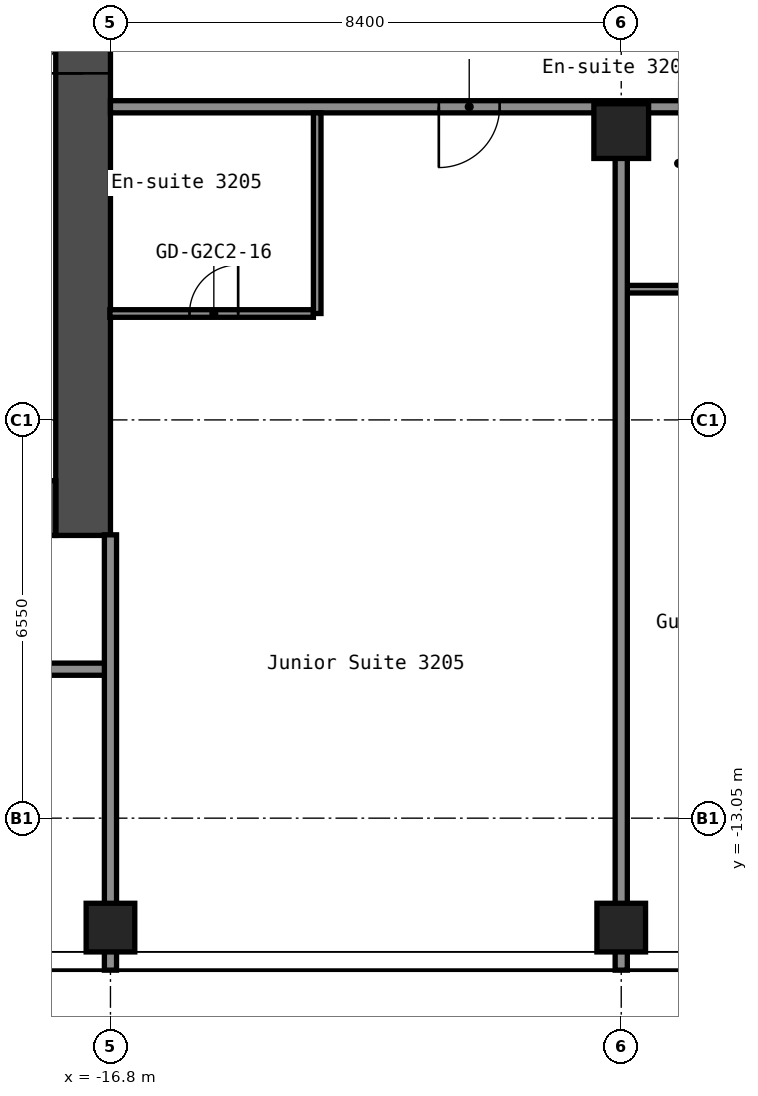
"""IFC4 building model, lengths in metres.
Left out: names, types, materials, properties, quantities, classifications, styles, units other than length and angle.
Written with IfcOpenShell. Run it as: python <this file> out.ifc"""

import sys

from ifc_helpers import new_model, si_unit, direction, frame, frame_2d, origin, origin_2d, place, context, subcontext, project, spatial, rectangle, hollow_rectangle, extrude, element, fill, save


model = new_model("IFC4")
c1 = context("Model", 3, precision=1e-05, world=origin(), true_north=direction((0.0, 1.0)))
c2 = subcontext(c1, "Body", "Model", "MODEL_VIEW")
j1 = project(units=[si_unit("LENGTHUNIT", "METRE"), si_unit("PLANEANGLEUNIT", "RADIAN")], contexts=[c1])
p1 = place(None, origin())
s1 = spatial("IfcSite", under=j1, at=p1, CompositionType="ELEMENT")
p2 = place(p1, origin())
s2 = spatial("IfcBuilding", under=s1, at=p2, CompositionType="ELEMENT")
p3 = place(p2, frame((0.0, 0.0, 113.8)))
s3 = spatial("IfcBuildingStorey", under=s2, at=p3, CompositionType="ELEMENT", Elevation=113.8)
for number, where, z_axis, x_axis in (
    (1, (-16.8, -14.85, 0.0), (0.0, 0.0, 1.0), (1.0, 0.0, 0.0)),
    (2, (-8.4, -14.85, 0.0), (0.0, 0.0, 1.0), (1.0, 0.0, 0.0)),
):
    element("IfcColumn", number, at=place(p3, frame(where, z_axis=z_axis, x_axis=x_axis)), inside=s3, PredefinedType="COLUMN", context=c2, shape_type="SweptSolid", body=[
        extrude(hollow_rectangle(XDim=0.8, YDim=0.8, WallThickness=0.032, at=origin_2d()), origin(), (0.0, 0.0, 1.0), 2.8),
    ])
p4 = place(p3, frame((-8.4, -1.75, 0.0), z_axis=(0.0, 0.0, 1.0), x_axis=(1.0, 0.0, 0.0)))
e3 = element("IfcColumn", 3, at=p4, inside=s3, PredefinedType="COLUMN", context=c2, shape_type="SweptSolid", body=[
    extrude(hollow_rectangle(XDim=0.9, YDim=0.9, WallThickness=0.036, at=origin_2d()), origin(), (0.0, 0.0, 1.0), 2.8),
])
p5 = place(p3, frame((-17.25, -8.4, 0.0), z_axis=(0.0, 0.0, 1.0), x_axis=(0.0, 1.0, 0.0)))
e4 = element("IfcWall", 4, at=p5, inside=s3, PredefinedType="SHEAR", context=c2, shape_type="SweptSolid", body=[
    extrude(rectangle(XDim=16.8, YDim=0.9, at=frame_2d((8.4, 0.0))), origin(), (0.0, 0.0, 1.0), 2.8),
])
p6 = place(p5, frame((7.6, 0.0, 0.0)))
e5 = element("IfcOpeningElement", 5, at=p6, cuts=e4, PredefinedType="OPENING", context=c2, shape_type="SweptSolid", body=[
    extrude(rectangle(XDim=1.2, YDim=2.1, at=frame_2d((0.6, 1.05))), frame((0.0, 0.46, 0.0), z_axis=(0.0, -1.0, 0.0), x_axis=(1.0, 0.0, 0.0)), (0.0, 0.0, 1.0), 0.92),
])
p7 = place(p3, frame((-32.7, -7.95, 0.0), z_axis=(0.0, 0.0, 1.0), x_axis=(1.0, 0.0, 0.0)))
e6 = element("IfcWall", 6, at=p7, inside=s3, PredefinedType="SHEAR", context=c2, shape_type="SweptSolid", body=[
    extrude(rectangle(XDim=15.0, YDim=0.9, at=frame_2d((7.5, 0.0))), origin(), (0.0, 0.0, 1.0), 2.8),
])
p8 = place(p7, frame((11.45, 0.0, 0.0)))
e7 = element("IfcOpeningElement", 7, at=p8, cuts=e6, PredefinedType="OPENING", context=c2, shape_type="SweptSolid", body=[
    extrude(rectangle(XDim=1.0, YDim=2.1, at=frame_2d((0.5, 1.05))), frame((0.0, 0.46, 0.0), z_axis=(0.0, -1.0, 0.0), x_axis=(1.0, 0.0, 0.0)), (0.0, 0.0, 1.0), 0.92),
])
p9 = place(p3, frame((-46.5, -10.6, 0.0), z_axis=(0.0, 0.0, 1.0), x_axis=(1.0, 0.0, 0.0)))
e8 = element("IfcWall", 8, at=p9, inside=s3, PredefinedType="PARTITIONING", context=c2, shape_type="SweptSolid", body=[
    extrude(rectangle(XDim=29.7, YDim=0.2, at=frame_2d((14.85, 0.0))), origin(), (0.0, 0.0, 1.0), 2.8),
])
p10 = place(p9, frame((1.95, 0.0, 0.0)))
e9 = element("IfcOpeningElement", 9, at=p10, cuts=e8, PredefinedType="OPENING", context=c2, shape_type="SweptSolid", body=[
    extrude(rectangle(XDim=0.9, YDim=2.1, at=frame_2d((0.45, 1.05))), frame((0.0, 0.11, 0.0), z_axis=(0.0, -1.0, 0.0), x_axis=(1.0, 0.0, 0.0)), (0.0, 0.0, 1.0), 0.22),
])
p11 = place(p9, frame((6.485, 0.0, 0.0)))
e10 = element("IfcOpeningElement", 10, at=p11, cuts=e8, PredefinedType="OPENING", context=c2, shape_type="SweptSolid", body=[
    extrude(rectangle(XDim=0.9, YDim=2.1, at=frame_2d((0.45, 1.05))), frame((0.0, 0.11, 0.0), z_axis=(0.0, -1.0, 0.0), x_axis=(1.0, 0.0, 0.0)), (0.0, 0.0, 1.0), 0.22),
])
p12 = place(p9, frame((10.685, 0.0, 0.0)))
e11 = element("IfcOpeningElement", 11, at=p12, cuts=e8, PredefinedType="OPENING", context=c2, shape_type="SweptSolid", body=[
    extrude(rectangle(XDim=0.9, YDim=2.1, at=frame_2d((0.45, 1.05))), frame((0.0, 0.11, 0.0), z_axis=(0.0, -1.0, 0.0), x_axis=(1.0, 0.0, 0.0)), (0.0, 0.0, 1.0), 0.22),
])
p13 = place(p9, frame((14.13, 0.0, 0.0)))
e12 = element("IfcOpeningElement", 12, at=p13, cuts=e8, PredefinedType="OPENING", context=c2, shape_type="SweptSolid", body=[
    extrude(rectangle(XDim=0.9, YDim=2.1, at=frame_2d((0.45, 1.05))), frame((0.0, 0.11, 0.0), z_axis=(0.0, -1.0, 0.0), x_axis=(1.0, 0.0, 0.0)), (0.0, 0.0, 1.0), 0.22),
])
p14 = place(p9, frame((18.33, 0.0, 0.0)))
e13 = element("IfcOpeningElement", 13, at=p14, cuts=e8, PredefinedType="OPENING", context=c2, shape_type="SweptSolid", body=[
    extrude(rectangle(XDim=0.9, YDim=2.1, at=frame_2d((0.45, 1.05))), frame((0.0, 0.11, 0.0), z_axis=(0.0, -1.0, 0.0), x_axis=(1.0, 0.0, 0.0)), (0.0, 0.0, 1.0), 0.22),
])
p15 = place(p9, frame((25.0, 0.0, 0.0)))
e14 = element("IfcOpeningElement", 14, at=p15, cuts=e8, PredefinedType="OPENING", context=c2, shape_type="SweptSolid", body=[
    extrude(rectangle(XDim=1.0, YDim=2.1, at=frame_2d((0.5, 1.05))), frame((0.0, 0.11, 0.0), z_axis=(0.0, -1.0, 0.0), x_axis=(1.0, 0.0, 0.0)), (0.0, 0.0, 1.0), 0.22),
])
p16 = place(p3, frame((-16.81, -4.75, 0.0), z_axis=(0.0, 0.0, 1.0), x_axis=(1.0, 0.0, 0.0)))
e15 = element("IfcWall", 15, at=p16, inside=s3, PredefinedType="PARTITIONING", context=c2, shape_type="SweptSolid", body=[
    extrude(rectangle(XDim=3.348, YDim=0.125, at=frame_2d((1.674, 0.0))), origin(), (0.0, 0.0, 1.0), 2.8),
])
p17 = place(p16, frame((1.31, 0.0, 0.0)))
e16 = element("IfcOpeningElement", 16, at=p17, cuts=e15, PredefinedType="OPENING", context=c2, shape_type="SweptSolid", body=[
    extrude(rectangle(XDim=0.8, YDim=2.1, at=frame_2d((0.4, 1.05))), frame((0.0, 0.073, 0.0), z_axis=(0.0, -1.0, 0.0), x_axis=(1.0, 0.0, 0.0)), (0.0, 0.0, 1.0), 0.145),
])
p18 = place(p3, frame((-8.3, -4.35, 0.0), z_axis=(0.0, 0.0, 1.0), x_axis=(1.0, 0.0, 0.0)))
e17 = element("IfcWall", 17, at=p18, inside=s3, PredefinedType="PARTITIONING", context=c2, shape_type="SweptSolid", body=[
    extrude(rectangle(XDim=2.338, YDim=0.125, at=frame_2d((1.169, 0.0))), origin(), (0.0, 0.0, 1.0), 2.8),
])
p19 = place(p3, frame((-16.8, -1.35, 0.0), z_axis=(0.0, 0.0, 1.0), x_axis=(1.0, 0.0, 0.0)))
e18 = element("IfcWall", 18, at=p19, inside=s3, PredefinedType="PARTITIONING", context=c2, shape_type="SweptSolid", body=[
    extrude(rectangle(XDim=33.6, YDim=0.2, at=frame_2d((16.8, 0.0))), origin(), (0.0, 0.0, 1.0), 2.8),
])
p20 = place(p19, frame((5.4, 0.0, 0.0)))
e19 = element("IfcOpeningElement", 19, at=p20, cuts=e18, PredefinedType="OPENING", context=c2, shape_type="SweptSolid", body=[
    extrude(rectangle(XDim=1.0, YDim=2.1, at=frame_2d((0.5, 1.05))), frame((0.0, 0.11, 0.0), z_axis=(0.0, -1.0, 0.0), x_axis=(1.0, 0.0, 0.0)), (0.0, 0.0, 1.0), 0.22),
])
p21 = place(p19, frame((11.25, 0.0, 0.0)))
e20 = element("IfcOpeningElement", 20, at=p21, cuts=e18, PredefinedType="OPENING", context=c2, shape_type="SweptSolid", body=[
    extrude(rectangle(XDim=1.0, YDim=2.1, at=frame_2d((0.5, 1.05))), frame((0.0, 0.11, 0.0), z_axis=(0.0, -1.0, 0.0), x_axis=(1.0, 0.0, 0.0)), (0.0, 0.0, 1.0), 0.22),
])
p22 = place(p19, frame((12.95, 0.0, 0.0)))
e21 = element("IfcOpeningElement", 21, at=p22, cuts=e18, PredefinedType="OPENING", context=c2, shape_type="SweptSolid", body=[
    extrude(rectangle(XDim=1.0, YDim=2.1, at=frame_2d((0.5, 1.05))), frame((0.0, 0.11, 0.0), z_axis=(0.0, -1.0, 0.0), x_axis=(1.0, 0.0, 0.0)), (0.0, 0.0, 1.0), 0.22),
])
p23 = place(p19, frame((17.945, 0.0, 0.0)))
e22 = element("IfcOpeningElement", 22, at=p23, cuts=e18, PredefinedType="OPENING", context=c2, shape_type="SweptSolid", body=[
    extrude(rectangle(XDim=0.9, YDim=2.1, at=frame_2d((0.45, 1.05))), frame((0.0, 0.11, 0.0), z_axis=(0.0, -1.0, 0.0), x_axis=(1.0, 0.0, 0.0)), (0.0, 0.0, 1.0), 0.22),
])
p24 = place(p19, frame((22.145, 0.0, 0.0)))
e23 = element("IfcOpeningElement", 23, at=p24, cuts=e18, PredefinedType="OPENING", context=c2, shape_type="SweptSolid", body=[
    extrude(rectangle(XDim=0.9, YDim=2.1, at=frame_2d((0.45, 1.05))), frame((0.0, 0.11, 0.0), z_axis=(0.0, -1.0, 0.0), x_axis=(1.0, 0.0, 0.0)), (0.0, 0.0, 1.0), 0.22),
])
p25 = place(p19, frame((28.05, 0.0, 0.0)))
e24 = element("IfcOpeningElement", 24, at=p25, cuts=e18, PredefinedType="OPENING", context=c2, shape_type="SweptSolid", body=[
    extrude(rectangle(XDim=1.0, YDim=2.1, at=frame_2d((0.5, 1.05))), frame((0.0, 0.11, 0.0), z_axis=(0.0, -1.0, 0.0), x_axis=(1.0, 0.0, 0.0)), (0.0, 0.0, 1.0), 0.22),
])
p26 = place(p19, frame((29.75, 0.0, 0.0)))
e25 = element("IfcOpeningElement", 25, at=p26, cuts=e18, PredefinedType="OPENING", context=c2, shape_type="SweptSolid", body=[
    extrude(rectangle(XDim=1.0, YDim=2.1, at=frame_2d((0.5, 1.05))), frame((0.0, 0.11, 0.0), z_axis=(0.0, -1.0, 0.0), x_axis=(1.0, 0.0, 0.0)), (0.0, 0.0, 1.0), 0.22),
])
p27 = place(p3, frame((-16.8, -15.55, 0.0), z_axis=(0.0, 0.0, 1.0), x_axis=(0.0, 1.0, 0.0)))
e26 = element("IfcWall", 26, at=p27, inside=s3, PredefinedType="PARTITIONING", context=c2, shape_type="SweptSolid", body=[
    extrude(rectangle(XDim=7.16, YDim=0.2, at=frame_2d((3.58, 0.0))), origin(), (0.0, 0.0, 1.0), 2.8),
])
p28 = place(p3, frame((-13.4, -4.75, 0.0), z_axis=(0.0, 0.0, 1.0), x_axis=(0.0, 1.0, 0.0)))
e27 = element("IfcWall", 27, at=p28, inside=s3, PredefinedType="PARTITIONING", context=c2, shape_type="SweptSolid", body=[
    extrude(rectangle(XDim=3.3, YDim=0.125, at=frame_2d((1.65, 0.0))), origin(), (0.0, 0.0, 1.0), 2.8),
])
p29 = place(p3, frame((-8.4, -15.55, 0.0), z_axis=(0.0, 0.0, 1.0), x_axis=(0.0, 1.0, 0.0)))
e28 = element("IfcWall", 28, at=p29, inside=s3, PredefinedType="PARTITIONING", context=c2, shape_type="SweptSolid", body=[
    extrude(rectangle(XDim=13.36, YDim=0.2, at=frame_2d((6.68, 0.0))), origin(), (0.0, 0.0, 1.0), 2.8),
])
p30 = place(p6, origin())
e29 = element("IfcDoor", 29, at=p30, inside=s3, OperationType="DOUBLE_DOOR_SINGLE_SWING", PredefinedType="DOOR", context=c2, shape_type="SweptSolid", body=[
    extrude(rectangle(XDim=1.2, YDim=2.1, at=frame_2d((0.6, 1.05))), frame((0.0, 0.025, 0.0), z_axis=(0.0, -1.0, 0.0), x_axis=(1.0, 0.0, 0.0)), (0.0, 0.0, 1.0), 0.05),
])
fill(e5, e29)
p31 = place(p17, origin())
e30 = element("IfcDoor", 30, at=p31, inside=s3, OperationType="SINGLE_SWING_LEFT", PredefinedType="DOOR", context=c2, shape_type="SweptSolid", body=[
    extrude(rectangle(XDim=0.8, YDim=2.1, at=frame_2d((0.4, 1.05))), frame((0.0, 0.025, 0.0), z_axis=(0.0, -1.0, 0.0), x_axis=(1.0, 0.0, 0.0)), (0.0, 0.0, 1.0), 0.05),
])
fill(e16, e30)
p32 = place(p20, origin())
e31 = element("IfcDoor", 31, at=p32, inside=s3, OperationType="SINGLE_SWING_LEFT", PredefinedType="DOOR", context=c2, shape_type="SweptSolid", body=[
    extrude(rectangle(XDim=1.0, YDim=2.1, at=frame_2d((0.5, 1.05))), frame((0.0, 0.025, 0.0), z_axis=(0.0, -1.0, 0.0), x_axis=(1.0, 0.0, 0.0)), (0.0, 0.0, 1.0), 0.05),
])
fill(e19, e31)
save(model, sys.argv[1])
